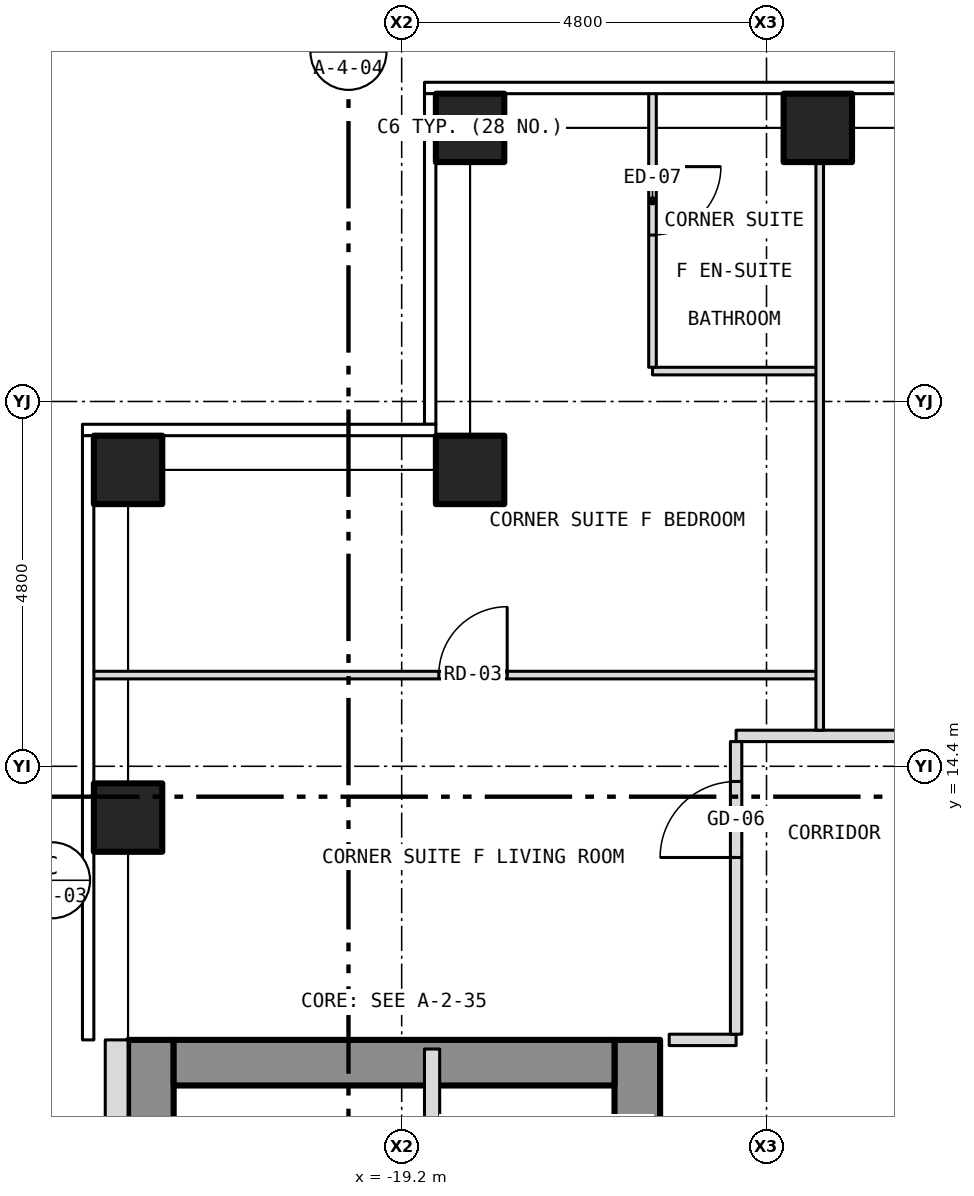
"""IFC4 building model, lengths in metres.
Left out: names, types, materials, properties, quantities, classifications, styles, units other than length and angle.
Written with IfcOpenShell. Run it as: python <this file> out.ifc"""

import sys

from ifc_helpers import new_model, si_unit, direction, frame, frame_2d, origin, origin_2d, place, context, subcontext, project, spatial, rectangle, hollow_rectangle, extrude, element, fill, save


model = new_model("IFC4")
c1 = context("Model", 3, precision=1e-05, world=origin(), true_north=direction((0.0, 1.0)))
c2 = subcontext(c1, "Body", "Model", "MODEL_VIEW")
j1 = project(units=[si_unit("LENGTHUNIT", "METRE"), si_unit("PLANEANGLEUNIT", "RADIAN")], contexts=[c1])
p1 = place(None, origin())
s1 = spatial("IfcSite", under=j1, at=p1, CompositionType="ELEMENT")
p2 = place(p1, origin())
s2 = spatial("IfcBuilding", under=s1, at=p2, CompositionType="ELEMENT")
p3 = place(p2, frame((0.0, 0.0, 127.5)))
s3 = spatial("IfcBuildingStorey", under=s2, at=p3, CompositionType="ELEMENT", Elevation=127.5)
for number, where, z_axis, x_axis in (
    (1, (-18.3, 22.8, -0.15), (0.0, 0.0, 1.0), (1.0, 0.0, 0.0)),
    (2, (-13.725, 22.8, -0.15), (0.0, 0.0, 1.0), (1.0, 0.0, 0.0)),
    (3, (-22.8, 13.725, -0.15), (0.0, 0.0, 1.0), (1.0, 0.0, 0.0)),
    (4, (-22.8, 18.3, -0.15), (0.0, 0.0, 1.0), (1.0, 0.0, 0.0)),
    (5, (-18.3, 18.3, -0.15), (0.0, 0.0, 1.0), (1.0, 0.0, 0.0)),
):
    element("IfcColumn", number, at=place(p3, frame(where, z_axis=z_axis, x_axis=x_axis)), inside=s3, PredefinedType="COLUMN", context=c2, shape_type="SweptSolid", body=[
        extrude(hollow_rectangle(XDim=0.9, YDim=0.9, WallThickness=0.05, at=origin_2d()), origin(), (0.0, 0.0, 1.0), 3.5),
    ])
p4 = place(p3, frame((-16.1, -10.8, 0.0), z_axis=(0.0, 0.0, 1.0), x_axis=(0.0, 1.0, 0.0)))
e6 = element("IfcWall", 6, at=p4, inside=s3, PredefinedType="SHEAR", context=c2, shape_type="SweptSolid", body=[
    extrude(rectangle(XDim=21.6, YDim=0.6, at=frame_2d((10.8, 0.0))), origin(), (0.0, 0.0, 1.0), 3.25),
])
p5 = place(p4, frame((9.4, 0.0, 0.0)))
e7 = element("IfcOpeningElement", 7, at=p5, cuts=e6, PredefinedType="OPENING", context=c2, shape_type="SweptSolid", body=[
    extrude(rectangle(XDim=1.1, YDim=2.1, at=frame_2d((0.55, 1.05))), frame((0.0, 0.312, 0.0), z_axis=(0.0, -1.0, 0.0), x_axis=(1.0, 0.0, 0.0)), (0.0, 0.0, 1.0), 0.624),
])
p6 = place(p4, frame((11.5, 0.0, 0.0)))
e8 = element("IfcOpeningElement", 8, at=p6, cuts=e6, PredefinedType="OPENING", context=c2, shape_type="SweptSolid", body=[
    extrude(rectangle(XDim=1.1, YDim=2.1, at=frame_2d((0.55, 1.05))), frame((0.0, 0.312, 0.0), z_axis=(0.0, -1.0, 0.0), x_axis=(1.0, 0.0, 0.0)), (0.0, 0.0, 1.0), 0.624),
])
p7 = place(p4, frame((13.6, 0.0, 0.0)))
e9 = element("IfcOpeningElement", 9, at=p7, cuts=e6, PredefinedType="OPENING", context=c2, shape_type="SweptSolid", body=[
    extrude(rectangle(XDim=1.1, YDim=2.1, at=frame_2d((0.55, 1.05))), frame((0.0, 0.312, 0.0), z_axis=(0.0, -1.0, 0.0), x_axis=(1.0, 0.0, 0.0)), (0.0, 0.0, 1.0), 0.624),
])
p8 = place(p4, frame((15.7, 0.0, 0.0)))
e10 = element("IfcOpeningElement", 10, at=p8, cuts=e6, PredefinedType="OPENING", context=c2, shape_type="SweptSolid", body=[
    extrude(rectangle(XDim=1.1, YDim=2.1, at=frame_2d((0.55, 1.05))), frame((0.0, 0.312, 0.0), z_axis=(0.0, -1.0, 0.0), x_axis=(1.0, 0.0, 0.0)), (0.0, 0.0, 1.0), 0.624),
])
p9 = place(p4, frame((17.8, 0.0, 0.0)))
e11 = element("IfcOpeningElement", 11, at=p9, cuts=e6, PredefinedType="OPENING", context=c2, shape_type="SweptSolid", body=[
    extrude(rectangle(XDim=1.1, YDim=2.1, at=frame_2d((0.55, 1.05))), frame((0.0, 0.312, 0.0), z_axis=(0.0, -1.0, 0.0), x_axis=(1.0, 0.0, 0.0)), (0.0, 0.0, 1.0), 0.624),
])
p10 = place(p4, frame((0.758, 0.0, 0.0)))
e12 = element("IfcOpeningElement", 12, at=p10, cuts=e6, PredefinedType="OPENING", context=c2, shape_type="SweptSolid", body=[
    extrude(rectangle(XDim=1.1, YDim=2.1, at=frame_2d((0.55, 1.05))), frame((0.0, 0.312, 0.0), z_axis=(0.0, -1.0, 0.0), x_axis=(1.0, 0.0, 0.0)), (0.0, 0.0, 1.0), 0.624),
])
p11 = place(p4, frame((7.5, 0.0, 0.0)))
e13 = element("IfcOpeningElement", 13, at=p11, cuts=e6, PredefinedType="OPENING", context=c2, shape_type="SweptSolid", body=[
    extrude(rectangle(XDim=1.1, YDim=2.1, at=frame_2d((0.55, 1.05))), frame((0.0, 0.312, 0.0), z_axis=(0.0, -1.0, 0.0), x_axis=(1.0, 0.0, 0.0)), (0.0, 0.0, 1.0), 0.624),
])
p12 = place(p3, frame((-22.5, -10.8, 0.0), z_axis=(0.0, 0.0, 1.0), x_axis=(0.0, 1.0, 0.0)))
e14 = element("IfcWall", 14, at=p12, inside=s3, PredefinedType="SHEAR", context=c2, shape_type="SweptSolid", body=[
    extrude(rectangle(XDim=21.6, YDim=0.6, at=frame_2d((10.8, 0.0))), origin(), (0.0, 0.0, 1.0), 3.25),
])
p13 = place(p3, frame((-22.2, 10.5, 0.0), z_axis=(0.0, 0.0, 1.0), x_axis=(1.0, 0.0, 0.0)))
e15 = element("IfcWall", 15, at=p13, inside=s3, PredefinedType="SHEAR", context=c2, shape_type="SweptSolid", body=[
    extrude(rectangle(XDim=5.8, YDim=0.6, at=frame_2d((2.9, 0.0))), origin(), (0.0, 0.0, 1.0), 3.25),
])
p14 = place(p3, frame((-22.95, 10.8, 0.0), z_axis=(0.0, 0.0, 1.0), x_axis=(0.0, -1.0, 0.0)))
e16 = element("IfcWall", 16, at=p14, inside=s3, PredefinedType="SOLIDWALL", context=c2, shape_type="SweptSolid", body=[
    extrude(rectangle(XDim=21.6, YDim=0.3, at=frame_2d((10.8, 0.0))), origin(), (0.0, 0.0, 1.0), 3.5),
])
p15 = place(p14, frame((18.05, 0.0, 1.0)))
e17 = element("IfcOpeningElement", 17, at=p15, cuts=e16, PredefinedType="OPENING", context=c2, shape_type="SweptSolid", body=[
    extrude(rectangle(XDim=0.6, YDim=1.5, at=frame_2d((0.3, 0.75))), frame((0.0, 0.162, 0.0), z_axis=(0.0, -1.0, 0.0), x_axis=(1.0, 0.0, 0.0)), (0.0, 0.0, 1.0), 0.324),
])
p16 = place(p3, frame((-15.68, 10.8, 0.0), z_axis=(0.0, 0.0, 1.0), x_axis=(1.0, 0.0, 0.0)))
e18 = element("IfcWall", 18, at=p16, inside=s3, PredefinedType="PARTITIONING", context=c2, shape_type="SweptSolid", body=[
    extrude(rectangle(XDim=0.88, YDim=0.15, at=frame_2d((0.44, 0.0))), origin(), (0.0, 0.0, 1.0), 3.35),
])
p17 = place(p3, frame((-14.8, 14.8, 0.0), z_axis=(0.0, 0.0, 1.0), x_axis=(1.0, 0.0, 0.0)))
e19 = element("IfcWall", 19, at=p17, inside=s3, PredefinedType="PARTITIONING", context=c2, shape_type="SweptSolid", body=[
    extrude(rectangle(XDim=6.85, YDim=0.15, at=frame_2d((3.425, 0.0))), origin(), (0.0, 0.0, 1.0), 3.35),
])
p18 = place(p17, frame((2.363, 0.0, 0.0)))
e20 = element("IfcOpeningElement", 20, at=p18, cuts=e19, PredefinedType="OPENING", context=c2, shape_type="SweptSolid", body=[
    extrude(rectangle(XDim=1.0, YDim=2.1, at=frame_2d((0.5, 1.05))), frame((0.0, 0.087, 0.0), z_axis=(0.0, -1.0, 0.0), x_axis=(1.0, 0.0, 0.0)), (0.0, 0.0, 1.0), 0.174),
])
p19 = place(p3, frame((-23.28, 15.6, 0.0), z_axis=(0.0, 0.0, 1.0), x_axis=(1.0, 0.0, 0.0)))
e21 = element("IfcWall", 21, at=p19, inside=s3, PredefinedType="PARTITIONING", context=c2, shape_type="SweptSolid", body=[
    extrude(rectangle(XDim=9.58, YDim=0.1, at=frame_2d((4.79, 0.0))), origin(), (0.0, 0.0, 1.0), 3.35),
])
p20 = place(p19, frame((4.568, 0.0, 0.0)))
e22 = element("IfcOpeningElement", 22, at=p20, cuts=e21, PredefinedType="OPENING", context=c2, shape_type="SweptSolid", body=[
    extrude(rectangle(XDim=0.9, YDim=2.1, at=frame_2d((0.45, 1.05))), frame((0.0, 0.062, 0.0), z_axis=(0.0, -1.0, 0.0), x_axis=(1.0, 0.0, 0.0)), (0.0, 0.0, 1.0), 0.124),
])
p21 = place(p3, frame((-15.9, 19.6, 0.0), z_axis=(0.0, 0.0, 1.0), x_axis=(1.0, 0.0, 0.0)))
e23 = element("IfcWall", 23, at=p21, inside=s3, PredefinedType="PARTITIONING", context=c2, shape_type="SweptSolid", body=[
    extrude(rectangle(XDim=2.2, YDim=0.1, at=frame_2d((1.1, 0.0))), origin(), (0.0, 0.0, 1.0), 3.35),
])
p22 = place(p3, frame((-18.8, -1.8, 0.0), z_axis=(0.0, 0.0, 1.0), x_axis=(0.0, 1.0, 0.0)))
e24 = element("IfcWall", 24, at=p22, inside=s3, PredefinedType="PARTITIONING", context=c2, shape_type="SweptSolid", body=[
    extrude(rectangle(XDim=12.48, YDim=0.2, at=frame_2d((6.24, 0.0))), origin(), (0.0, 0.0, 1.0), 3.25),
])
p23 = place(p3, frame((-15.9, 19.65, 0.0), z_axis=(0.0, 0.0, 1.0), x_axis=(0.0, 1.0, 0.0)))
e25 = element("IfcWall", 25, at=p23, inside=s3, PredefinedType="PARTITIONING", context=c2, shape_type="SweptSolid", body=[
    extrude(rectangle(XDim=3.63, YDim=0.1, at=frame_2d((1.815, 0.0))), origin(), (0.0, 0.0, 1.0), 3.35),
])
p24 = place(p23, frame((1.74, 0.0, 0.0)))
e26 = element("IfcOpeningElement", 26, at=p24, cuts=e25, PredefinedType="OPENING", context=c2, shape_type="SweptSolid", body=[
    extrude(rectangle(XDim=0.9, YDim=2.1, at=frame_2d((0.45, 1.05))), frame((0.0, 0.062, 0.0), z_axis=(0.0, -1.0, 0.0), x_axis=(1.0, 0.0, 0.0)), (0.0, 0.0, 1.0), 0.124),
])
p25 = place(p3, frame((-14.8, 10.875, 0.0), z_axis=(0.0, 0.0, 1.0), x_axis=(0.0, 1.0, 0.0)))
e27 = element("IfcWall", 27, at=p25, inside=s3, PredefinedType="PARTITIONING", context=c2, shape_type="SweptSolid", body=[
    extrude(rectangle(XDim=3.85, YDim=0.15, at=frame_2d((1.925, 0.0))), origin(), (0.0, 0.0, 1.0), 3.35),
])
p26 = place(p25, frame((2.325, 0.0, 0.0)))
e28 = element("IfcOpeningElement", 28, at=p26, cuts=e27, PredefinedType="OPENING", context=c2, shape_type="SweptSolid", body=[
    extrude(rectangle(XDim=1.0, YDim=2.1, at=frame_2d((0.5, 1.05))), frame((0.0, 0.087, 0.0), z_axis=(0.0, -1.0, 0.0), x_axis=(1.0, 0.0, 0.0)), (0.0, 0.0, 1.0), 0.174),
])
p27 = place(p3, frame((-13.7, 14.875, 0.0), z_axis=(0.0, 0.0, 1.0), x_axis=(0.0, 1.0, 0.0)))
e29 = element("IfcWall", 29, at=p27, inside=s3, PredefinedType="PARTITIONING", context=c2, shape_type="SweptSolid", body=[
    extrude(rectangle(XDim=7.805, YDim=0.1, at=frame_2d((3.902, 0.0))), origin(), (0.0, 0.0, 1.0), 3.35),
])
p28 = place(p26, origin())
e30 = element("IfcDoor", 30, at=p28, inside=s3, OperationType="SINGLE_SWING_LEFT", PredefinedType="DOOR", context=c2, shape_type="SweptSolid", body=[
    extrude(rectangle(XDim=1.0, YDim=2.1, at=frame_2d((0.5, 1.05))), frame((0.0, 0.025, 0.0), z_axis=(0.0, -1.0, 0.0), x_axis=(1.0, 0.0, 0.0)), (0.0, 0.0, 1.0), 0.05),
])
fill(e28, e30)
p29 = place(p20, origin())
e31 = element("IfcDoor", 31, at=p29, inside=s3, OperationType="SINGLE_SWING_RIGHT", PredefinedType="DOOR", context=c2, shape_type="SweptSolid", body=[
    extrude(rectangle(XDim=0.9, YDim=2.1, at=frame_2d((0.45, 1.05))), frame((0.0, 0.025, 0.0), z_axis=(0.0, -1.0, 0.0), x_axis=(1.0, 0.0, 0.0)), (0.0, 0.0, 1.0), 0.05),
])
fill(e22, e31)
p30 = place(p24, origin())
e32 = element("IfcDoor", 32, at=p30, inside=s3, OperationType="SINGLE_SWING_RIGHT", PredefinedType="DOOR", context=c2, shape_type="SweptSolid", body=[
    extrude(rectangle(XDim=0.9, YDim=2.1, at=frame_2d((0.45, 1.05))), frame((0.0, 0.025, 0.0), z_axis=(0.0, -1.0, 0.0), x_axis=(1.0, 0.0, 0.0)), (0.0, 0.0, 1.0), 0.05),
])
fill(e26, e32)
save(model, sys.argv[1])
